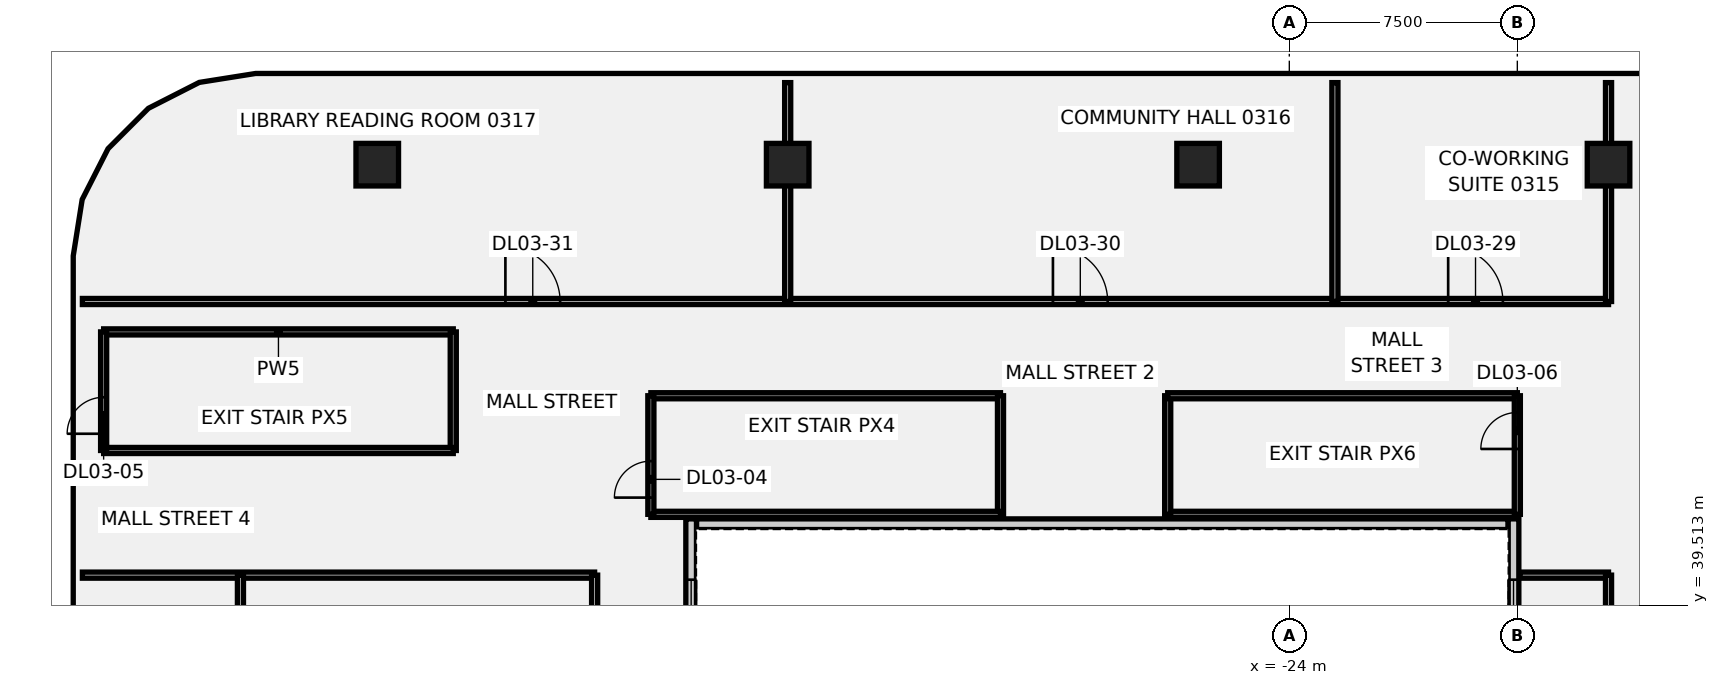
"""IFC4 building model, lengths in metres.
Left out: names, types, materials, properties, quantities, classifications, styles, units other than length and angle.
Written with IfcOpenShell. Run it as: python <this file> out.ifc"""

import sys

from ifc_helpers import new_model, si_unit, direction, frame, frame_2d, origin, origin_2d, place, context, subcontext, project, spatial, rectangle, extrude, element, fill, save


model = new_model("IFC4")
c1 = context("Model", 3, precision=1e-05, world=origin(), true_north=direction((0.0, 1.0)))
c2 = subcontext(c1, "Body", "Model", "MODEL_VIEW")
j1 = project(units=[si_unit("LENGTHUNIT", "METRE"), si_unit("PLANEANGLEUNIT", "RADIAN")], contexts=[c1])
p1 = place(None, origin())
s1 = spatial("IfcSite", under=j1, at=p1, CompositionType="ELEMENT")
p2 = place(p1, origin())
s2 = spatial("IfcBuilding", under=s1, at=p2, CompositionType="ELEMENT")
p3 = place(p2, frame((0.0, 0.0, 20.0)))
s3 = spatial("IfcBuildingStorey", under=s2, at=p3, CompositionType="ELEMENT", Elevation=20.0)
for number, where, z_axis, x_axis in (
    (1, (-54.0, 54.0, -0.5), (0.0, 0.0, 1.0), (1.0, 0.0, 0.0)),
    (2, (-40.5, 54.0, -0.5), (0.0, 0.0, 1.0), (1.0, 0.0, 0.0)),
    (3, (-27.0, 54.0, -0.5), (0.0, 0.0, 1.0), (1.0, 0.0, 0.0)),
    (4, (-13.5, 54.0, -0.5), (0.0, 0.0, 1.0), (1.0, 0.0, 0.0)),
):
    element("IfcColumn", number, at=place(p3, frame(where, z_axis=z_axis, x_axis=x_axis)), inside=s3, PredefinedType="COLUMN", context=c2, shape_type="SweptSolid", body=[
        extrude(rectangle(XDim=1.4, YDim=1.4, at=origin_2d()), origin(), (0.0, 0.0, 1.0), 5.05),
    ])
p4 = place(p3, frame((-63.0, 48.5, 0.0), z_axis=(0.0, 0.0, 1.0), x_axis=(1.0, 0.0, 0.0)))
e5 = element("IfcWall", 5, at=p4, inside=s3, PredefinedType="PARTITIONING", context=c2, shape_type="SweptSolid", body=[
    extrude(rectangle(XDim=11.5, YDim=0.2, at=frame_2d((5.75, 0.0))), origin(), (0.0, 0.0, 1.0), 4.55),
])
p5 = place(p3, frame((-51.5, 44.6, 0.0), z_axis=(0.0, 0.0, 1.0), x_axis=(0.0, 1.0, 0.0)))
e6 = element("IfcWall", 6, at=p5, inside=s3, PredefinedType="PARTITIONING", context=c2, shape_type="SweptSolid", body=[
    extrude(rectangle(XDim=3.9, YDim=0.2, at=frame_2d((1.95, 0.0))), origin(), (0.0, 0.0, 1.0), 4.55),
])
p6 = place(p3, frame((-63.0, 44.6, 0.0), z_axis=(0.0, 0.0, 1.0), x_axis=(1.0, 0.0, 0.0)))
e7 = element("IfcWall", 7, at=p6, inside=s3, PredefinedType="PARTITIONING", context=c2, shape_type="SweptSolid", body=[
    extrude(rectangle(XDim=11.5, YDim=0.2, at=frame_2d((5.75, 0.0))), origin(), (0.0, 0.0, 1.0), 4.55),
])
p7 = place(p3, frame((-63.0, 44.6, 0.0), z_axis=(0.0, 0.0, 1.0), x_axis=(0.0, 1.0, 0.0)))
e8 = element("IfcWall", 8, at=p7, inside=s3, PredefinedType="PARTITIONING", context=c2, shape_type="SweptSolid", body=[
    extrude(rectangle(XDim=3.9, YDim=0.2, at=frame_2d((1.95, 0.0))), origin(), (0.0, 0.0, 1.0), 4.55),
])
p8 = place(p7, frame((0.55, 0.0, 0.0)))
e9 = element("IfcOpeningElement", 9, at=p8, cuts=e8, PredefinedType="OPENING", context=c2, shape_type="SweptSolid", body=[
    extrude(rectangle(XDim=1.2, YDim=2.1, at=frame_2d((0.6, 1.05))), frame((0.0, 0.11, 0.0), z_axis=(0.0, -1.0, 0.0), x_axis=(1.0, 0.0, 0.0)), (0.0, 0.0, 1.0), 0.22),
])
p9 = place(p3, frame((-45.0, 46.4, 0.0), z_axis=(0.0, 0.0, 1.0), x_axis=(1.0, 0.0, 0.0)))
e10 = element("IfcWall", 10, at=p9, inside=s3, PredefinedType="PARTITIONING", context=c2, shape_type="SweptSolid", body=[
    extrude(rectangle(XDim=11.5, YDim=0.2, at=frame_2d((5.75, 0.0))), origin(), (0.0, 0.0, 1.0), 4.55),
])
p10 = place(p3, frame((-33.5, 42.5, 0.0), z_axis=(0.0, 0.0, 1.0), x_axis=(0.0, 1.0, 0.0)))
e11 = element("IfcWall", 11, at=p10, inside=s3, PredefinedType="PARTITIONING", context=c2, shape_type="SweptSolid", body=[
    extrude(rectangle(XDim=3.9, YDim=0.2, at=frame_2d((1.95, 0.0))), origin(), (0.0, 0.0, 1.0), 4.55),
])
p11 = place(p3, frame((-45.0, 42.5, 0.0), z_axis=(0.0, 0.0, 1.0), x_axis=(1.0, 0.0, 0.0)))
e12 = element("IfcWall", 12, at=p11, inside=s3, PredefinedType="PARTITIONING", context=c2, shape_type="SweptSolid", body=[
    extrude(rectangle(XDim=11.5, YDim=0.2, at=frame_2d((5.75, 0.0))), origin(), (0.0, 0.0, 1.0), 4.55),
])
p12 = place(p3, frame((-45.0, 42.5, 0.0), z_axis=(0.0, 0.0, 1.0), x_axis=(0.0, 1.0, 0.0)))
e13 = element("IfcWall", 13, at=p12, inside=s3, PredefinedType="PARTITIONING", context=c2, shape_type="SweptSolid", body=[
    extrude(rectangle(XDim=3.9, YDim=0.2, at=frame_2d((1.95, 0.0))), origin(), (0.0, 0.0, 1.0), 4.55),
])
p13 = place(p12, frame((0.55, 0.0, 0.0)))
e14 = element("IfcOpeningElement", 14, at=p13, cuts=e13, PredefinedType="OPENING", context=c2, shape_type="SweptSolid", body=[
    extrude(rectangle(XDim=1.2, YDim=2.1, at=frame_2d((0.6, 1.05))), frame((0.0, 0.11, 0.0), z_axis=(0.0, -1.0, 0.0), x_axis=(1.0, 0.0, 0.0)), (0.0, 0.0, 1.0), 0.22),
])
p14 = place(p3, frame((-28.0, 42.5, 0.0), z_axis=(0.0, 0.0, 1.0), x_axis=(1.0, 0.0, 0.0)))
e15 = element("IfcWall", 15, at=p14, inside=s3, PredefinedType="PARTITIONING", context=c2, shape_type="SweptSolid", body=[
    extrude(rectangle(XDim=11.5, YDim=0.2, at=frame_2d((5.75, 0.0))), origin(), (0.0, 0.0, 1.0), 4.55),
])
p15 = place(p3, frame((-28.0, 42.5, 0.0), z_axis=(0.0, 0.0, 1.0), x_axis=(0.0, 1.0, 0.0)))
e16 = element("IfcWall", 16, at=p15, inside=s3, PredefinedType="PARTITIONING", context=c2, shape_type="SweptSolid", body=[
    extrude(rectangle(XDim=3.9, YDim=0.2, at=frame_2d((1.95, 0.0))), origin(), (0.0, 0.0, 1.0), 4.55),
])
p16 = place(p3, frame((-28.0, 46.4, 0.0), z_axis=(0.0, 0.0, 1.0), x_axis=(1.0, 0.0, 0.0)))
e17 = element("IfcWall", 17, at=p16, inside=s3, PredefinedType="PARTITIONING", context=c2, shape_type="SweptSolid", body=[
    extrude(rectangle(XDim=11.5, YDim=0.2, at=frame_2d((5.75, 0.0))), origin(), (0.0, 0.0, 1.0), 4.55),
])
p17 = place(p3, frame((-16.5, 42.5, 0.0), z_axis=(0.0, 0.0, 1.0), x_axis=(0.0, 1.0, 0.0)))
e18 = element("IfcWall", 18, at=p17, inside=s3, PredefinedType="PARTITIONING", context=c2, shape_type="SweptSolid", body=[
    extrude(rectangle(XDim=3.9, YDim=0.2, at=frame_2d((1.95, 0.0))), origin(), (0.0, 0.0, 1.0), 4.55),
])
p18 = place(p17, frame((2.15, 0.0, 0.0)))
e19 = element("IfcOpeningElement", 19, at=p18, cuts=e18, PredefinedType="OPENING", context=c2, shape_type="SweptSolid", body=[
    extrude(rectangle(XDim=1.2, YDim=2.1, at=frame_2d((0.6, 1.05))), frame((0.0, 0.11, 0.0), z_axis=(0.0, -1.0, 0.0), x_axis=(1.0, 0.0, 0.0)), (0.0, 0.0, 1.0), 0.22),
])
p19 = place(p3, frame((-63.699, 40.5, 0.0), z_axis=(0.0, 0.0, 1.0), x_axis=(1.0, 0.0, 0.0)))
e20 = element("IfcWall", 20, at=p19, inside=s3, PredefinedType="PARTITIONING", context=c2, shape_type="SweptSolid", body=[
    extrude(rectangle(XDim=16.849, YDim=0.2, at=frame_2d((8.424, 0.0))), origin(), (0.0, 0.0, 1.0), 4.55),
])
p20 = place(p3, frame((-63.699, 49.5, 0.0), z_axis=(0.0, 0.0, 1.0), x_axis=(1.0, 0.0, 0.0)))
e21 = element("IfcWall", 21, at=p20, inside=s3, PredefinedType="PARTITIONING", context=c2, shape_type="SweptSolid", body=[
    extrude(rectangle(XDim=50.199, YDim=0.2, at=frame_2d((25.1, 0.0))), origin(), (0.0, 0.0, 1.0), 4.55),
])
p21 = place(p20, frame((44.924, 0.0, 0.0)))
e22 = element("IfcOpeningElement", 22, at=p21, cuts=e21, PredefinedType="OPENING", context=c2, shape_type="SweptSolid", body=[
    extrude(rectangle(XDim=1.8, YDim=2.1, at=frame_2d((0.9, 1.05))), frame((0.0, 0.11, 0.0), z_axis=(0.0, -1.0, 0.0), x_axis=(1.0, 0.0, 0.0)), (0.0, 0.0, 1.0), 0.22),
])
p22 = place(p20, frame((31.924, 0.0, 0.0)))
e23 = element("IfcOpeningElement", 23, at=p22, cuts=e21, PredefinedType="OPENING", context=c2, shape_type="SweptSolid", body=[
    extrude(rectangle(XDim=1.8, YDim=2.1, at=frame_2d((0.9, 1.05))), frame((0.0, 0.11, 0.0), z_axis=(0.0, -1.0, 0.0), x_axis=(1.0, 0.0, 0.0)), (0.0, 0.0, 1.0), 0.22),
])
p23 = place(p20, frame((13.914, 0.0, 0.0)))
e24 = element("IfcOpeningElement", 24, at=p23, cuts=e21, PredefinedType="OPENING", context=c2, shape_type="SweptSolid", body=[
    extrude(rectangle(XDim=1.8, YDim=2.1, at=frame_2d((0.9, 1.05))), frame((0.0, 0.11, 0.0), z_axis=(0.0, -1.0, 0.0), x_axis=(1.0, 0.0, 0.0)), (0.0, 0.0, 1.0), 0.22),
])
for number, where, z_axis, x_axis in (
    (25, (-46.85, 31.5, 0.0), (0.0, 0.0, 1.0), (0.0, 1.0, 0.0)),
    (26, (-58.5, 31.5, 0.0), (0.0, 0.0, 1.0), (0.0, 1.0, 0.0)),
):
    element("IfcWall", number, at=place(p3, frame(where, z_axis=z_axis, x_axis=x_axis)), inside=s3, PredefinedType="PARTITIONING", context=c2, shape_type="SweptSolid", body=[
        extrude(rectangle(XDim=9.0, YDim=0.2, at=frame_2d((4.5, 0.0))), origin(), (0.0, 0.0, 1.0), 4.55),
    ])
for number, where, z_axis, x_axis in (
    (27, (-40.5, 49.5, 0.0), (0.0, 0.0, 1.0), (0.0, 1.0, 0.0)),
    (28, (-13.5, 49.5, 0.0), (0.0, 0.0, 1.0), (0.0, 1.0, 0.0)),
    (29, (-22.5, 49.5, 0.0), (0.0, 0.0, 1.0), (0.0, 1.0, 0.0)),
):
    element("IfcWall", number, at=place(p3, frame(where, z_axis=z_axis, x_axis=x_axis)), inside=s3, PredefinedType="PARTITIONING", context=c2, shape_type="SweptSolid", body=[
        extrude(rectangle(XDim=7.199, YDim=0.2, at=frame_2d((3.6, 0.0))), origin(), (0.0, 0.0, 1.0), 4.55),
    ])
p24 = place(p3, frame((-16.42, 40.5, 0.0), z_axis=(0.0, 0.0, 1.0), x_axis=(1.0, 0.0, 0.0)))
e30 = element("IfcWall", 30, at=p24, inside=s3, PredefinedType="PARTITIONING", context=c2, shape_type="SweptSolid", body=[
    extrude(rectangle(XDim=2.92, YDim=0.2, at=frame_2d((1.46, 0.0))), origin(), (0.0, 0.0, 1.0), 4.55),
])
p25 = place(p3, frame((-13.5, 31.5, 0.0), z_axis=(0.0, 0.0, 1.0), x_axis=(0.0, 1.0, 0.0)))
e31 = element("IfcWall", 31, at=p25, inside=s3, PredefinedType="PARTITIONING", context=c2, shape_type="SweptSolid", body=[
    extrude(rectangle(XDim=9.0, YDim=0.2, at=frame_2d((4.5, 0.0))), origin(), (0.0, 0.0, 1.0), 4.55),
])
p26 = place(p25, frame((3.61, 0.0, 0.0)))
e32 = element("IfcOpeningElement", 32, at=p26, cuts=e31, PredefinedType="OPENING", context=c2, shape_type="SweptSolid", body=[
    extrude(rectangle(XDim=1.8, YDim=2.1, at=frame_2d((0.9, 1.05))), frame((0.0, 0.11, 0.0), z_axis=(0.0, -1.0, 0.0), x_axis=(1.0, 0.0, 0.0)), (0.0, 0.0, 1.0), 0.22),
])
p27 = place(p3, frame((-43.5, 42.175, 0.0), z_axis=(0.0, 0.0, 1.0), x_axis=(1.0, 0.0, 0.0)))
e33 = element("IfcWall", 33, at=p27, inside=s3, PredefinedType="SOLIDWALL", context=c2, shape_type="SweptSolid", body=[
    extrude(rectangle(XDim=26.7, YDim=0.35, at=frame_2d((13.35, 0.0))), origin(), (0.0, 0.0, 1.0), 4.55),
])
p28 = place(p3, frame((-43.675, 23.65, 0.0), z_axis=(0.0, 0.0, 1.0), x_axis=(0.0, 1.0, 0.0)))
e34 = element("IfcWall", 34, at=p28, inside=s3, PredefinedType="SOLIDWALL", context=c2, shape_type="SweptSolid", body=[
    extrude(rectangle(XDim=18.7, YDim=0.35, at=frame_2d((9.35, 0.0))), origin(), (0.0, 0.0, 1.0), 4.55),
])
p29 = place(p28, frame((14.3, 0.0, 1.0)))
e35 = element("IfcOpeningElement", 35, at=p29, cuts=e34, PredefinedType="OPENING", context=c2, shape_type="SweptSolid", body=[
    extrude(rectangle(XDim=2.4, YDim=1.8, at=frame_2d((1.2, 0.9))), frame((0.0, 0.185, 0.0), z_axis=(0.0, -1.0, 0.0), x_axis=(1.0, 0.0, 0.0)), (0.0, 0.0, 1.0), 0.37),
])
p30 = place(p3, frame((-16.625, 23.65, 0.0), z_axis=(0.0, 0.0, 1.0), x_axis=(0.0, 1.0, 0.0)))
e36 = element("IfcWall", 36, at=p30, inside=s3, PredefinedType="SOLIDWALL", context=c2, shape_type="SweptSolid", body=[
    extrude(rectangle(XDim=18.7, YDim=0.35, at=frame_2d((9.35, 0.0))), origin(), (0.0, 0.0, 1.0), 4.55),
])
p31 = place(p30, frame((14.3, 0.0, 1.0)))
e37 = element("IfcOpeningElement", 37, at=p31, cuts=e36, PredefinedType="OPENING", context=c2, shape_type="SweptSolid", body=[
    extrude(rectangle(XDim=2.4, YDim=1.8, at=frame_2d((1.2, 0.9))), frame((0.0, 0.185, 0.0), z_axis=(0.0, -1.0, 0.0), x_axis=(1.0, 0.0, 0.0)), (0.0, 0.0, 1.0), 0.37),
])
p32 = place(p13, origin())
e38 = element("IfcDoor", 38, at=p32, inside=s3, OperationType="SINGLE_SWING_RIGHT", PredefinedType="DOOR", context=c2, shape_type="SweptSolid", body=[
    extrude(rectangle(XDim=1.2, YDim=2.1, at=frame_2d((0.6, 1.05))), frame((0.0, 0.025, 0.0), z_axis=(0.0, -1.0, 0.0), x_axis=(1.0, 0.0, 0.0)), (0.0, 0.0, 1.0), 0.05),
])
fill(e14, e38)
p33 = place(p8, origin())
e39 = element("IfcDoor", 39, at=p33, inside=s3, OperationType="SINGLE_SWING_LEFT", PredefinedType="DOOR", context=c2, shape_type="SweptSolid", body=[
    extrude(rectangle(XDim=1.2, YDim=2.1, at=frame_2d((0.6, 1.05))), frame((0.0, 0.025, 0.0), z_axis=(0.0, -1.0, 0.0), x_axis=(1.0, 0.0, 0.0)), (0.0, 0.0, 1.0), 0.05),
])
fill(e9, e39)
p34 = place(p18, origin())
e40 = element("IfcDoor", 40, at=p34, inside=s3, OperationType="SINGLE_SWING_RIGHT", PredefinedType="DOOR", context=c2, shape_type="SweptSolid", body=[
    extrude(rectangle(XDim=1.2, YDim=2.1, at=frame_2d((0.6, 1.05))), frame((0.0, 0.025, 0.0), z_axis=(0.0, -1.0, 0.0), x_axis=(1.0, 0.0, 0.0)), (0.0, 0.0, 1.0), 0.05),
])
fill(e19, e40)
p35 = place(p21, origin())
e41 = element("IfcDoor", 41, at=p35, inside=s3, OperationType="SINGLE_SWING_LEFT", PredefinedType="DOOR", context=c2, shape_type="SweptSolid", body=[
    extrude(rectangle(XDim=1.8, YDim=2.1, at=frame_2d((0.9, 1.05))), frame((0.0, 0.025, 0.0), z_axis=(0.0, -1.0, 0.0), x_axis=(1.0, 0.0, 0.0)), (0.0, 0.0, 1.0), 0.05),
])
fill(e22, e41)
p36 = place(p22, origin())
e42 = element("IfcDoor", 42, at=p36, inside=s3, OperationType="SINGLE_SWING_RIGHT", PredefinedType="DOOR", context=c2, shape_type="SweptSolid", body=[
    extrude(rectangle(XDim=1.8, YDim=2.1, at=frame_2d((0.9, 1.05))), frame((0.0, 0.025, 0.0), z_axis=(0.0, -1.0, 0.0), x_axis=(1.0, 0.0, 0.0)), (0.0, 0.0, 1.0), 0.05),
])
fill(e23, e42)
p37 = place(p23, origin())
e43 = element("IfcDoor", 43, at=p37, inside=s3, OperationType="SINGLE_SWING_LEFT", PredefinedType="DOOR", context=c2, shape_type="SweptSolid", body=[
    extrude(rectangle(XDim=1.8, YDim=2.1, at=frame_2d((0.9, 1.05))), frame((0.0, 0.025, 0.0), z_axis=(0.0, -1.0, 0.0), x_axis=(1.0, 0.0, 0.0)), (0.0, 0.0, 1.0), 0.05),
])
fill(e24, e43)
p38 = place(p29, origin())
e44 = element("IfcWindow", 44, at=p38, inside=s3, PartitioningType="SINGLE_PANEL", PredefinedType="WINDOW", context=c2, shape_type="SweptSolid", body=[
    extrude(rectangle(XDim=2.4, YDim=1.8, at=frame_2d((1.2, 0.9))), frame((0.0, 0.03, 0.0), z_axis=(0.0, -1.0, 0.0), x_axis=(1.0, 0.0, 0.0)), (0.0, 0.0, 1.0), 0.06),
])
fill(e35, e44)
p39 = place(p31, origin())
e45 = element("IfcWindow", 45, at=p39, inside=s3, PartitioningType="SINGLE_PANEL", PredefinedType="WINDOW", context=c2, shape_type="SweptSolid", body=[
    extrude(rectangle(XDim=2.4, YDim=1.8, at=frame_2d((1.2, 0.9))), frame((0.0, 0.03, 0.0), z_axis=(0.0, -1.0, 0.0), x_axis=(1.0, 0.0, 0.0)), (0.0, 0.0, 1.0), 0.06),
])
fill(e37, e45)
save(model, sys.argv[1])
